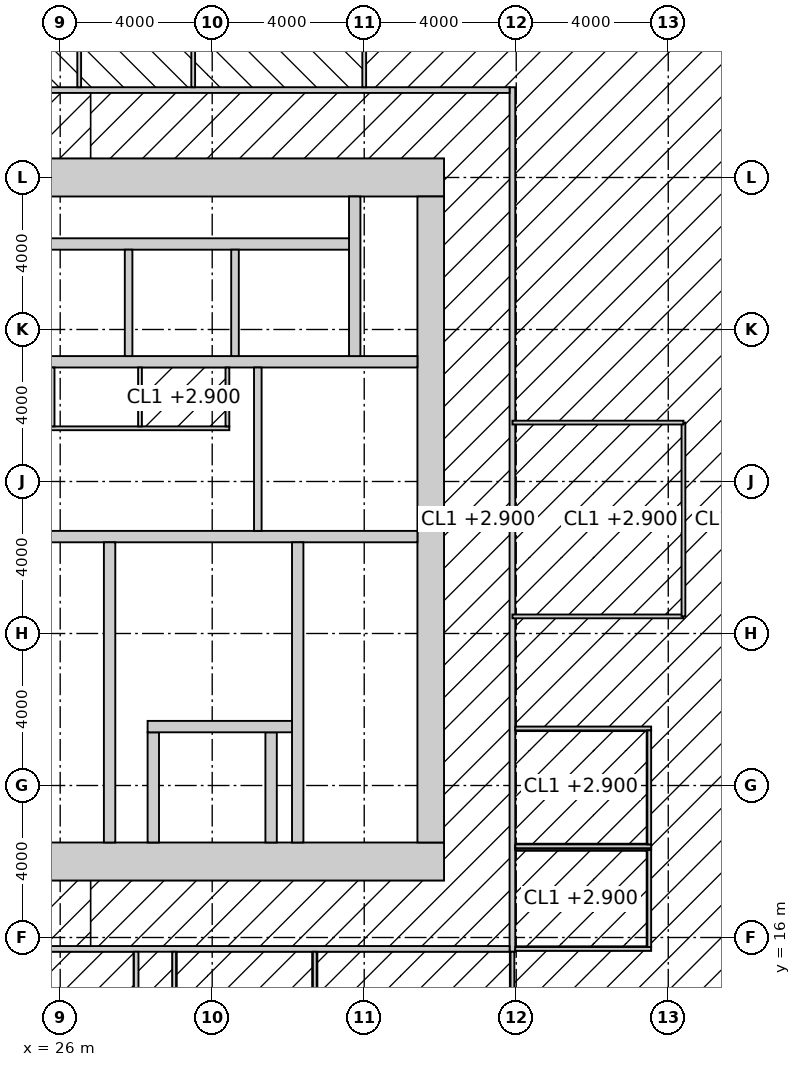
"""IFC4 building model, lengths in metres.
Left out: names, types, materials, properties, quantities, classifications, styles, units other than length and angle.
Written with IfcOpenShell. Run it as: python <this file> out.ifc"""

import sys

from ifc_helpers import new_model, si_unit, direction, frame, frame_2d, origin, place, context, subcontext, project, spatial, rectangle, extrude, element, fill, save


model = new_model("IFC4")
c1 = context("Model", 3, precision=1e-05, world=origin(), true_north=direction((0.0, 1.0)))
c2 = subcontext(c1, "Body", "Model", "MODEL_VIEW")
j1 = project(units=[si_unit("LENGTHUNIT", "METRE"), si_unit("PLANEANGLEUNIT", "RADIAN")], contexts=[c1])
p1 = place(None, origin())
s1 = spatial("IfcSite", under=j1, at=p1, CompositionType="ELEMENT")
p2 = place(p1, origin())
s2 = spatial("IfcBuilding", under=s1, at=p2, CompositionType="ELEMENT")
p3 = place(p2, frame((0.0, 0.0, 147.8)))
s3 = spatial("IfcBuildingStorey", under=s2, at=p3, CompositionType="ELEMENT", Elevation=147.8)
p4 = place(p3, frame((18.5, 18.0, -0.15), z_axis=(0.0, 0.0, 1.0), x_axis=(1.0, 0.0, 0.0)))
e1 = element("IfcWall", 1, at=p4, inside=s3, PredefinedType="SHEAR", context=c2, shape_type="SweptSolid", body=[
    extrude(rectangle(XDim=17.6, YDim=1.0, at=frame_2d((8.8, 0.0))), origin(), (0.0, 0.0, 1.0), 4.0),
])
p5 = place(p4, frame((3.45, 0.0, 0.15)))
e2 = element("IfcOpeningElement", 2, at=p5, cuts=e1, PredefinedType="OPENING", context=c2, shape_type="SweptSolid", body=[
    extrude(rectangle(XDim=1.5, YDim=2.4, at=frame_2d((0.75, 1.2))), frame((0.0, 0.51, 0.0), z_axis=(0.0, -1.0, 0.0), x_axis=(1.0, 0.0, 0.0)), (0.0, 0.0, 1.0), 1.02),
])
p6 = place(p3, frame((18.5, 36.0, -0.15), z_axis=(0.0, 0.0, 1.0), x_axis=(1.0, 0.0, 0.0)))
e3 = element("IfcWall", 3, at=p6, inside=s3, PredefinedType="SHEAR", context=c2, shape_type="SweptSolid", body=[
    extrude(rectangle(XDim=17.6, YDim=1.0, at=frame_2d((8.8, 0.0))), origin(), (0.0, 0.0, 1.0), 4.0),
])
p7 = place(p3, frame((35.75, 18.5, -0.15), z_axis=(0.0, 0.0, 1.0), x_axis=(0.0, 1.0, 0.0)))
e4 = element("IfcWall", 4, at=p7, inside=s3, PredefinedType="SHEAR", context=c2, shape_type="SweptSolid", body=[
    extrude(rectangle(XDim=17.0, YDim=0.7, at=frame_2d((8.5, 0.0))), origin(), (0.0, 0.0, 1.0), 4.0),
])
p8 = place(p7, frame((9.85, 0.0, 0.15)))
e5 = element("IfcOpeningElement", 5, at=p8, cuts=e4, PredefinedType="OPENING", context=c2, shape_type="SweptSolid", body=[
    extrude(rectangle(XDim=1.0, YDim=2.2, at=frame_2d((0.5, 1.1))), frame((0.0, 0.36, 0.0), z_axis=(0.0, -1.0, 0.0), x_axis=(1.0, 0.0, 0.0)), (0.0, 0.0, 1.0), 0.72),
])
p9 = place(p3, frame((24.15, 26.55, -0.15), z_axis=(0.0, 0.0, 1.0), x_axis=(1.0, 0.0, 0.0)))
e6 = element("IfcWall", 6, at=p9, inside=s3, PredefinedType="SHEAR", context=c2, shape_type="SweptSolid", body=[
    extrude(rectangle(XDim=11.25, YDim=0.3, at=frame_2d((5.625, 0.0))), origin(), (0.0, 0.0, 1.0), 4.0),
])
p10 = place(p9, frame((9.25, 0.0, 0.15)))
e7 = element("IfcOpeningElement", 7, at=p10, cuts=e6, PredefinedType="OPENING", context=c2, shape_type="SweptSolid", body=[
    extrude(rectangle(XDim=1.0, YDim=2.2, at=frame_2d((0.5, 1.1))), frame((0.0, 0.16, 0.0), z_axis=(0.0, -1.0, 0.0), x_axis=(1.0, 0.0, 0.0)), (0.0, 0.0, 1.0), 0.32),
])
p11 = place(p9, frame((4.9, 0.0, 0.15)))
e8 = element("IfcOpeningElement", 8, at=p11, cuts=e6, PredefinedType="OPENING", context=c2, shape_type="SweptSolid", body=[
    extrude(rectangle(XDim=1.5, YDim=2.4, at=frame_2d((0.75, 1.2))), frame((0.0, 0.16, 0.0), z_axis=(0.0, -1.0, 0.0), x_axis=(1.0, 0.0, 0.0)), (0.0, 0.0, 1.0), 0.32),
])
p12 = place(p3, frame((27.3, 18.5, -0.15), z_axis=(0.0, 0.0, 1.0), x_axis=(0.0, 1.0, 0.0)))
e9 = element("IfcWall", 9, at=p12, inside=s3, PredefinedType="SHEAR", context=c2, shape_type="SweptSolid", body=[
    extrude(rectangle(XDim=7.9, YDim=0.3, at=frame_2d((3.95, 0.0))), origin(), (0.0, 0.0, 1.0), 4.0),
])
p13 = place(p12, frame((6.4, 0.0, 0.15)))
e10 = element("IfcOpeningElement", 10, at=p13, cuts=e9, PredefinedType="OPENING", context=c2, shape_type="SweptSolid", body=[
    extrude(rectangle(XDim=1.0, YDim=2.2, at=frame_2d((0.5, 1.1))), frame((0.0, 0.16, 0.0), z_axis=(0.0, -1.0, 0.0), x_axis=(1.0, 0.0, 0.0)), (0.0, 0.0, 1.0), 0.32),
])
p14 = place(p3, frame((32.25, 18.5, -0.15), z_axis=(0.0, 0.0, 1.0), x_axis=(0.0, 1.0, 0.0)))
e11 = element("IfcWall", 11, at=p14, inside=s3, PredefinedType="SHEAR", context=c2, shape_type="SweptSolid", body=[
    extrude(rectangle(XDim=7.9, YDim=0.3, at=frame_2d((3.95, 0.0))), origin(), (0.0, 0.0, 1.0), 4.0),
])
for number, where, z_axis, x_axis in (
    (12, (28.45, 18.5, -0.15), (0.0, 0.0, 1.0), (0.0, 1.0, 0.0)),
    (13, (31.55, 18.5, -0.15), (0.0, 0.0, 1.0), (0.0, 1.0, 0.0)),
):
    element("IfcWall", number, at=place(p3, frame(where, z_axis=z_axis, x_axis=x_axis)), inside=s3, PredefinedType="SHEAR", context=c2, shape_type="SweptSolid", body=[
        extrude(rectangle(XDim=2.9, YDim=0.3, at=frame_2d((1.45, 0.0))), origin(), (0.0, 0.0, 1.0), 4.0),
    ])
p15 = place(p3, frame((28.3, 21.55, -0.15), z_axis=(0.0, 0.0, 1.0), x_axis=(1.0, 0.0, 0.0)))
e14 = element("IfcWall", 14, at=p15, inside=s3, PredefinedType="SHEAR", context=c2, shape_type="SweptSolid", body=[
    extrude(rectangle(XDim=3.8, YDim=0.3, at=frame_2d((1.9, 0.0))), origin(), (0.0, 0.0, 1.0), 4.0),
])
p16 = place(p15, frame((1.05, 0.0, 0.15)))
e15 = element("IfcOpeningElement", 15, at=p16, cuts=e14, PredefinedType="OPENING", context=c2, shape_type="SweptSolid", body=[
    extrude(rectangle(XDim=1.3, YDim=2.4, at=frame_2d((0.65, 1.2))), frame((0.0, 0.16, 0.0), z_axis=(0.0, -1.0, 0.0), x_axis=(1.0, 0.0, 0.0)), (0.0, 0.0, 1.0), 0.32),
])
p17 = place(p3, frame((24.15, 31.15, -0.15), z_axis=(0.0, 0.0, 1.0), x_axis=(1.0, 0.0, 0.0)))
e16 = element("IfcWall", 16, at=p17, inside=s3, PredefinedType="SHEAR", context=c2, shape_type="SweptSolid", body=[
    extrude(rectangle(XDim=11.25, YDim=0.3, at=frame_2d((5.625, 0.0))), origin(), (0.0, 0.0, 1.0), 4.0),
])
p18 = place(p17, frame((7.25, 0.0, 0.15)))
e17 = element("IfcOpeningElement", 17, at=p18, cuts=e16, PredefinedType="OPENING", context=c2, shape_type="SweptSolid", body=[
    extrude(rectangle(XDim=1.4, YDim=2.4, at=frame_2d((0.7, 1.2))), frame((0.0, 0.16, 0.0), z_axis=(0.0, -1.0, 0.0), x_axis=(1.0, 0.0, 0.0)), (0.0, 0.0, 1.0), 0.32),
])
p19 = place(p3, frame((33.75, 31.3, -0.15), z_axis=(0.0, 0.0, 1.0), x_axis=(0.0, 1.0, 0.0)))
e18 = element("IfcWall", 18, at=p19, inside=s3, PredefinedType="SHEAR", context=c2, shape_type="SweptSolid", body=[
    extrude(rectangle(XDim=4.2, YDim=0.3, at=frame_2d((2.1, 0.0))), origin(), (0.0, 0.0, 1.0), 4.0),
])
p20 = place(p3, frame((25.0, 34.25, -0.15), z_axis=(0.0, 0.0, 1.0), x_axis=(1.0, 0.0, 0.0)))
e19 = element("IfcWall", 19, at=p20, inside=s3, PredefinedType="SHEAR", context=c2, shape_type="SweptSolid", body=[
    extrude(rectangle(XDim=8.6, YDim=0.3, at=frame_2d((4.3, 0.0))), origin(), (0.0, 0.0, 1.0), 4.0),
])
for number, where, z_axis, x_axis in (
    (20, (27.8, 31.3, -0.15), (0.0, 0.0, 1.0), (0.0, 1.0, 0.0)),
    (21, (30.6, 31.3, -0.15), (0.0, 0.0, 1.0), (0.0, 1.0, 0.0)),
):
    element("IfcWall", number, at=place(p3, frame(where, z_axis=z_axis, x_axis=x_axis)), inside=s3, PredefinedType="SOLIDWALL", context=c2, shape_type="SweptSolid", body=[
        extrude(rectangle(XDim=2.8, YDim=0.2, at=frame_2d((1.4, 0.0))), origin(), (0.0, 0.0, 1.0), 4.0),
    ])
p21 = place(p3, frame((31.2, 26.7, 0.0), z_axis=(0.0, 0.0, 1.0), x_axis=(0.0, 1.0, 0.0)))
e22 = element("IfcWall", 22, at=p21, inside=s3, PredefinedType="SOLIDWALL", context=c2, shape_type="SweptSolid", body=[
    extrude(rectangle(XDim=4.3, YDim=0.2, at=frame_2d((2.15, 0.0))), origin(), (0.0, 0.0, 1.0), 3.85),
])
p22 = place(p3, frame((25.75, 29.4, 0.0), z_axis=(0.0, 0.0, 1.0), x_axis=(1.0, 0.0, 0.0)))
e23 = element("IfcWall", 23, at=p22, inside=s3, PredefinedType="PARTITIONING", context=c2, shape_type="SweptSolid", body=[
    extrude(rectangle(XDim=4.7, YDim=0.1, at=frame_2d((2.35, 0.0))), origin(), (0.0, 0.0, 1.0), 3.85),
])
p23 = place(p22, frame((0.7, 0.0, 0.0)))
e24 = element("IfcOpeningElement", 24, at=p23, cuts=e23, PredefinedType="OPENING", context=c2, shape_type="SweptSolid", body=[
    extrude(rectangle(XDim=1.0, YDim=2.2, at=frame_2d((0.5, 1.1))), frame((0.0, 0.06, 0.0), z_axis=(0.0, -1.0, 0.0), x_axis=(1.0, 0.0, 0.0)), (0.0, 0.0, 1.0), 0.12),
])
p24 = place(p22, frame((3.0, 0.0, 0.0)))
e25 = element("IfcOpeningElement", 25, at=p24, cuts=e23, PredefinedType="OPENING", context=c2, shape_type="SweptSolid", body=[
    extrude(rectangle(XDim=1.0, YDim=2.2, at=frame_2d((0.5, 1.1))), frame((0.0, 0.06, 0.0), z_axis=(0.0, -1.0, 0.0), x_axis=(1.0, 0.0, 0.0)), (0.0, 0.0, 1.0), 0.12),
])
for number, where, z_axis, x_axis in (
    (26, (25.8, 29.45, 0.0), (0.0, 0.0, 1.0), (0.0, 1.0, 0.0)),
    (27, (30.4, 29.45, 0.0), (0.0, 0.0, 1.0), (0.0, 1.0, 0.0)),
    (28, (28.1, 29.45, 0.0), (0.0, 0.0, 1.0), (0.0, 1.0, 0.0)),
):
    element("IfcWall", number, at=place(p3, frame(where, z_axis=z_axis, x_axis=x_axis)), inside=s3, PredefinedType="PARTITIONING", context=c2, shape_type="SweptSolid", body=[
        extrude(rectangle(XDim=1.55, YDim=0.1, at=frame_2d((0.775, 0.0))), origin(), (0.0, 0.0, 1.0), 3.85),
    ])
p25 = place(p3, frame((37.9, 15.625, 0.0), z_axis=(0.0, 0.0, 1.0), x_axis=(0.0, 1.0, 0.0)))
e29 = element("IfcWall", 29, at=p25, inside=s3, PredefinedType="PARTITIONING", context=c2, shape_type="SweptSolid", body=[
    extrude(rectangle(XDim=22.75, YDim=0.15, at=frame_2d((11.375, 0.0))), origin(), (0.0, 0.0, 1.0), 2.95),
])
p26 = place(p25, frame((10.475, 0.0, 0.0)))
e30 = element("IfcOpeningElement", 30, at=p26, cuts=e29, PredefinedType="OPENING", context=c2, shape_type="SweptSolid", body=[
    extrude(rectangle(XDim=1.8, YDim=2.4, at=frame_2d((0.9, 1.2))), frame((0.0, 0.085, 0.0), z_axis=(0.0, -1.0, 0.0), x_axis=(1.0, 0.0, 0.0)), (0.0, 0.0, 1.0), 0.17),
])
p27 = place(p3, frame((15.175, 15.7, 0.0), z_axis=(0.0, 0.0, 1.0), x_axis=(1.0, 0.0, 0.0)))
e31 = element("IfcWall", 31, at=p27, inside=s3, PredefinedType="PARTITIONING", context=c2, shape_type="SweptSolid", body=[
    extrude(rectangle(XDim=22.65, YDim=0.15, at=frame_2d((11.325, 0.0))), origin(), (0.0, 0.0, 1.0), 3.85),
])
p28 = place(p3, frame((15.175, 38.3, 0.0), z_axis=(0.0, 0.0, 1.0), x_axis=(1.0, 0.0, 0.0)))
e32 = element("IfcWall", 32, at=p28, inside=s3, PredefinedType="PARTITIONING", context=c2, shape_type="SweptSolid", body=[
    extrude(rectangle(XDim=22.65, YDim=0.15, at=frame_2d((11.325, 0.0))), origin(), (0.0, 0.0, 1.0), 3.85),
])
p29 = place(p28, frame((8.575, 0.0, 0.0)))
e33 = element("IfcOpeningElement", 33, at=p29, cuts=e32, PredefinedType="OPENING", context=c2, shape_type="SweptSolid", body=[
    extrude(rectangle(XDim=0.9, YDim=2.1, at=frame_2d((0.45, 1.05))), frame((0.0, 0.085, 0.0), z_axis=(0.0, -1.0, 0.0), x_axis=(1.0, 0.0, 0.0)), (0.0, 0.0, 1.0), 0.17),
])
p30 = place(p28, frame((12.325, 0.0, 0.0)))
e34 = element("IfcOpeningElement", 34, at=p30, cuts=e32, PredefinedType="OPENING", context=c2, shape_type="SweptSolid", body=[
    extrude(rectangle(XDim=1.0, YDim=2.1, at=frame_2d((0.5, 1.05))), frame((0.0, 0.085, 0.0), z_axis=(0.0, -1.0, 0.0), x_axis=(1.0, 0.0, 0.0)), (0.0, 0.0, 1.0), 0.17),
])
p31 = place(p28, frame((16.175, 0.0, 0.0)))
e35 = element("IfcOpeningElement", 35, at=p31, cuts=e32, PredefinedType="OPENING", context=c2, shape_type="SweptSolid", body=[
    extrude(rectangle(XDim=0.9, YDim=2.1, at=frame_2d((0.45, 1.05))), frame((0.0, 0.085, 0.0), z_axis=(0.0, -1.0, 0.0), x_axis=(1.0, 0.0, 0.0)), (0.0, 0.0, 1.0), 0.17),
])
p32 = place(p3, frame((34.0, 38.375, 0.0), z_axis=(0.0, 0.0, 1.0), x_axis=(0.0, 1.0, 0.0)))
e36 = element("IfcWall", 36, at=p32, inside=s3, PredefinedType="PARTITIONING", context=c2, shape_type="SweptSolid", body=[
    extrude(rectangle(XDim=3.675, YDim=0.1, at=frame_2d((1.837, 0.0))), origin(), (0.0, 0.0, 1.0), 2.95),
])
for number, where, z_axis, x_axis in (
    (37, (26.5, 38.375, 0.0), (0.0, 0.0, 1.0), (0.0, 1.0, 0.0)),
    (38, (29.5, 38.375, 0.0), (0.0, 0.0, 1.0), (0.0, 1.0, 0.0)),
):
    element("IfcWall", number, at=place(p3, frame(where, z_axis=z_axis, x_axis=x_axis)), inside=s3, PredefinedType="PARTITIONING", context=c2, shape_type="SweptSolid", body=[
        extrude(rectangle(XDim=3.575, YDim=0.1, at=frame_2d((1.788, 0.0))), origin(), (0.0, 0.0, 1.0), 3.85),
    ])
p33 = place(p3, frame((28.0, 4.3, 0.0), z_axis=(0.0, 0.0, 1.0), x_axis=(0.0, 1.0, 0.0)))
e39 = element("IfcWall", 39, at=p33, inside=s3, PredefinedType="PARTITIONING", context=c2, shape_type="SweptSolid", body=[
    extrude(rectangle(XDim=11.325, YDim=0.12, at=frame_2d((5.663, 0.0))), origin(), (0.0, 0.0, 1.0), 3.85),
])
for number, where, z_axis, x_axis in (
    (40, (37.975, 15.7, 0.0), (0.0, 0.0, 1.0), (1.0, 0.0, 0.0)),
    (41, (37.975, 18.35, 0.0), (0.0, 0.0, 1.0), (1.0, 0.0, 0.0)),
    (42, (37.975, 18.4, 0.0), (0.0, 0.0, 1.0), (1.0, 0.0, 0.0)),
    (43, (37.975, 21.5, 0.0), (0.0, 0.0, 1.0), (1.0, 0.0, 0.0)),
):
    element("IfcWall", number, at=place(p3, frame(where, z_axis=z_axis, x_axis=x_axis)), inside=s3, PredefinedType="PARTITIONING", context=c2, shape_type="SweptSolid", body=[
        extrude(rectangle(XDim=3.575, YDim=0.1, at=frame_2d((1.788, 0.0))), origin(), (0.0, 0.0, 1.0), 3.85),
    ])
for number, where, z_axis, x_axis in (
    (44, (28.999, 11.55, 0.0), (0.0, 0.0, 1.0), (0.0, 1.0, 0.0)),
    (45, (32.699, 11.55, 0.0), (0.0, 0.0, 1.0), (0.0, 1.0, 0.0)),
):
    element("IfcWall", number, at=place(p3, frame(where, z_axis=z_axis, x_axis=x_axis)), inside=s3, PredefinedType="PARTITIONING", context=c2, shape_type="SweptSolid", body=[
        extrude(rectangle(XDim=4.075, YDim=0.1, at=frame_2d((2.038, 0.0))), origin(), (0.0, 0.0, 1.0), 3.85),
    ])
p34 = place(p3, frame((37.9, 11.55, 0.0), z_axis=(0.0, 0.0, 1.0), x_axis=(0.0, 1.0, 0.0)))
e46 = element("IfcWall", 46, at=p34, inside=s3, PredefinedType="PARTITIONING", context=c2, shape_type="SweptSolid", body=[
    extrude(rectangle(XDim=4.075, YDim=0.1, at=frame_2d((2.038, 0.0))), origin(), (0.0, 0.0, 1.0), 2.95),
])
p35 = place(p3, frame((41.5, 15.75, 0.0), z_axis=(0.0, 0.0, 1.0), x_axis=(0.0, 1.0, 0.0)))
e47 = element("IfcWall", 47, at=p35, inside=s3, PredefinedType="PARTITIONING", context=c2, shape_type="SweptSolid", body=[
    extrude(rectangle(XDim=2.55, YDim=0.1, at=frame_2d((1.275, 0.0))), origin(), (0.0, 0.0, 1.0), 3.85),
])
p36 = place(p35, frame((0.775, 0.0, 0.0)))
e48 = element("IfcOpeningElement", 48, at=p36, cuts=e47, PredefinedType="OPENING", context=c2, shape_type="SweptSolid", body=[
    extrude(rectangle(XDim=1.0, YDim=2.2, at=frame_2d((0.5, 1.1))), frame((0.0, 0.06, 0.0), z_axis=(0.0, -1.0, 0.0), x_axis=(1.0, 0.0, 0.0)), (0.0, 0.0, 1.0), 0.12),
])
p37 = place(p3, frame((41.5, 18.45, 0.0), z_axis=(0.0, 0.0, 1.0), x_axis=(0.0, 1.0, 0.0)))
e49 = element("IfcWall", 49, at=p37, inside=s3, PredefinedType="PARTITIONING", context=c2, shape_type="SweptSolid", body=[
    extrude(rectangle(XDim=3.0, YDim=0.1, at=frame_2d((1.5, 0.0))), origin(), (0.0, 0.0, 1.0), 3.85),
])
p38 = place(p37, frame((1.0, 0.0, 0.0)))
e50 = element("IfcOpeningElement", 50, at=p38, cuts=e49, PredefinedType="OPENING", context=c2, shape_type="SweptSolid", body=[
    extrude(rectangle(XDim=1.0, YDim=2.2, at=frame_2d((0.5, 1.1))), frame((0.0, 0.06, 0.0), z_axis=(0.0, -1.0, 0.0), x_axis=(1.0, 0.0, 0.0)), (0.0, 0.0, 1.0), 0.12),
])
p39 = place(p3, frame((37.9, 24.45, 0.0), z_axis=(0.0, 0.0, 1.0), x_axis=(1.0, 0.0, 0.0)))
e51 = element("IfcWall", 51, at=p39, inside=s3, PredefinedType="PARTITIONING", context=c2, shape_type="SweptSolid", body=[
    extrude(rectangle(XDim=4.5, YDim=0.1, at=frame_2d((2.25, 0.0))), origin(), (0.0, 0.0, 1.0), 3.85),
])
p40 = place(p3, frame((42.4, 24.45, 0.0), z_axis=(0.0, 0.0, 1.0), x_axis=(0.0, 1.0, 0.0)))
e52 = element("IfcWall", 52, at=p40, inside=s3, PredefinedType="PARTITIONING", context=c2, shape_type="SweptSolid", body=[
    extrude(rectangle(XDim=5.1, YDim=0.1, at=frame_2d((2.55, 0.0))), origin(), (0.0, 0.0, 1.0), 3.85),
])
p41 = place(p40, frame((2.05, 0.0, 0.0)))
e53 = element("IfcOpeningElement", 53, at=p41, cuts=e52, PredefinedType="OPENING", context=c2, shape_type="SweptSolid", body=[
    extrude(rectangle(XDim=1.0, YDim=2.2, at=frame_2d((0.5, 1.1))), frame((0.0, 0.06, 0.0), z_axis=(0.0, -1.0, 0.0), x_axis=(1.0, 0.0, 0.0)), (0.0, 0.0, 1.0), 0.12),
])
p42 = place(p3, frame((42.4, 29.55, 0.0), z_axis=(0.0, 0.0, 1.0), x_axis=(-1.0, 0.0, 0.0)))
e54 = element("IfcWall", 54, at=p42, inside=s3, PredefinedType="PARTITIONING", context=c2, shape_type="SweptSolid", body=[
    extrude(rectangle(XDim=4.5, YDim=0.1, at=frame_2d((2.25, 0.0))), origin(), (0.0, 0.0, 1.0), 3.85),
])
p43 = place(p13, origin())
e55 = element("IfcDoor", 55, at=p43, inside=s3, OperationType="SINGLE_SWING_RIGHT", PredefinedType="DOOR", context=c2, shape_type="SweptSolid", body=[
    extrude(rectangle(XDim=1.0, YDim=2.2, at=frame_2d((0.5, 1.1))), frame((0.0, 0.025, 0.0), z_axis=(0.0, -1.0, 0.0), x_axis=(1.0, 0.0, 0.0)), (0.0, 0.0, 1.0), 0.05),
])
fill(e10, e55)
p44 = place(p10, frame((1.0, 0.0, 0.0), z_axis=(0.0, 0.0, 1.0), x_axis=(-1.0, 0.0, 0.0)))
e56 = element("IfcDoor", 56, at=p44, inside=s3, OperationType="SINGLE_SWING_RIGHT", PredefinedType="DOOR", context=c2, shape_type="SweptSolid", body=[
    extrude(rectangle(XDim=1.0, YDim=2.2, at=frame_2d((0.5, 1.1))), frame((0.0, 0.025, 0.0), z_axis=(0.0, -1.0, 0.0), x_axis=(1.0, 0.0, 0.0)), (0.0, 0.0, 1.0), 0.05),
])
fill(e7, e56)
p45 = place(p8, origin())
e57 = element("IfcDoor", 57, at=p45, inside=s3, OperationType="SINGLE_SWING_RIGHT", PredefinedType="DOOR", context=c2, shape_type="SweptSolid", body=[
    extrude(rectangle(XDim=1.0, YDim=2.2, at=frame_2d((0.5, 1.1))), frame((0.0, 0.025, 0.0), z_axis=(0.0, -1.0, 0.0), x_axis=(1.0, 0.0, 0.0)), (0.0, 0.0, 1.0), 0.05),
])
fill(e5, e57)
p46 = place(p11, origin())
e58 = element("IfcDoor", 58, at=p46, inside=s3, OperationType="DOUBLE_DOOR_DOUBLE_SWING", PredefinedType="DOOR", context=c2, shape_type="SweptSolid", body=[
    extrude(rectangle(XDim=1.5, YDim=2.4, at=frame_2d((0.75, 1.2))), frame((0.0, 0.025, 0.0), z_axis=(0.0, -1.0, 0.0), x_axis=(1.0, 0.0, 0.0)), (0.0, 0.0, 1.0), 0.05),
])
fill(e8, e58)
p47 = place(p23, origin())
e59 = element("IfcDoor", 59, at=p47, inside=s3, OperationType="SINGLE_SWING_LEFT", PredefinedType="DOOR", context=c2, shape_type="SweptSolid", body=[
    extrude(rectangle(XDim=1.0, YDim=2.2, at=frame_2d((0.5, 1.1))), frame((0.0, 0.025, 0.0), z_axis=(0.0, -1.0, 0.0), x_axis=(1.0, 0.0, 0.0)), (0.0, 0.0, 1.0), 0.05),
])
fill(e24, e59)
p48 = place(p24, origin())
e60 = element("IfcDoor", 60, at=p48, inside=s3, OperationType="SINGLE_SWING_LEFT", PredefinedType="DOOR", context=c2, shape_type="SweptSolid", body=[
    extrude(rectangle(XDim=1.0, YDim=2.2, at=frame_2d((0.5, 1.1))), frame((0.0, 0.025, 0.0), z_axis=(0.0, -1.0, 0.0), x_axis=(1.0, 0.0, 0.0)), (0.0, 0.0, 1.0), 0.05),
])
fill(e25, e60)
p49 = place(p30, origin())
e61 = element("IfcDoor", 61, at=p49, inside=s3, OperationType="SLIDING_TO_LEFT", PredefinedType="DOOR", context=c2, shape_type="SweptSolid", body=[
    extrude(rectangle(XDim=1.0, YDim=2.1, at=frame_2d((0.5, 1.05))), frame((0.0, 0.025, 0.0), z_axis=(0.0, -1.0, 0.0), x_axis=(1.0, 0.0, 0.0)), (0.0, 0.0, 1.0), 0.05),
])
fill(e34, e61)
p50 = place(p31, origin())
e62 = element("IfcDoor", 62, at=p50, inside=s3, OperationType="SINGLE_SWING_LEFT", PredefinedType="DOOR", context=c2, shape_type="SweptSolid", body=[
    extrude(rectangle(XDim=0.9, YDim=2.1, at=frame_2d((0.45, 1.05))), frame((0.0, 0.025, 0.0), z_axis=(0.0, -1.0, 0.0), x_axis=(1.0, 0.0, 0.0)), (0.0, 0.0, 1.0), 0.05),
])
fill(e35, e62)
p51 = place(p26, origin())
e63 = element("IfcDoor", 63, at=p51, inside=s3, OperationType="DOUBLE_DOOR_DOUBLE_SWING", PredefinedType="DOOR", context=c2, shape_type="SweptSolid", body=[
    extrude(rectangle(XDim=1.8, YDim=2.4, at=frame_2d((0.9, 1.2))), frame((0.0, 0.025, 0.0), z_axis=(0.0, -1.0, 0.0), x_axis=(1.0, 0.0, 0.0)), (0.0, 0.0, 1.0), 0.05),
])
fill(e30, e63)
p52 = place(p36, origin())
e64 = element("IfcDoor", 64, at=p52, inside=s3, OperationType="SINGLE_SWING_LEFT", PredefinedType="DOOR", context=c2, shape_type="SweptSolid", body=[
    extrude(rectangle(XDim=1.0, YDim=2.2, at=frame_2d((0.5, 1.1))), frame((0.0, 0.025, 0.0), z_axis=(0.0, -1.0, 0.0), x_axis=(1.0, 0.0, 0.0)), (0.0, 0.0, 1.0), 0.05),
])
fill(e48, e64)
p53 = place(p38, origin())
e65 = element("IfcDoor", 65, at=p53, inside=s3, OperationType="SINGLE_SWING_LEFT", PredefinedType="DOOR", context=c2, shape_type="SweptSolid", body=[
    extrude(rectangle(XDim=1.0, YDim=2.2, at=frame_2d((0.5, 1.1))), frame((0.0, 0.025, 0.0), z_axis=(0.0, -1.0, 0.0), x_axis=(1.0, 0.0, 0.0)), (0.0, 0.0, 1.0), 0.05),
])
fill(e50, e65)
p54 = place(p41, origin())
e66 = element("IfcDoor", 66, at=p54, inside=s3, OperationType="SINGLE_SWING_RIGHT", PredefinedType="DOOR", context=c2, shape_type="SweptSolid", body=[
    extrude(rectangle(XDim=1.0, YDim=2.2, at=frame_2d((0.5, 1.1))), frame((0.0, 0.025, 0.0), z_axis=(0.0, -1.0, 0.0), x_axis=(1.0, 0.0, 0.0)), (0.0, 0.0, 1.0), 0.05),
])
fill(e53, e66)
p55 = place(p16, origin())
e67 = element("IfcDoor", 67, at=p55, inside=s3, OperationType="DOUBLE_DOOR_SLIDING", PredefinedType="DOOR", context=c2, shape_type="SweptSolid", body=[
    extrude(rectangle(XDim=1.3, YDim=2.4, at=frame_2d((0.65, 1.2))), frame((0.0, 0.025, 0.0), z_axis=(0.0, -1.0, 0.0), x_axis=(1.0, 0.0, 0.0)), (0.0, 0.0, 1.0), 0.05),
])
fill(e15, e67)
p56 = place(p18, origin())
e68 = element("IfcDoor", 68, at=p56, inside=s3, OperationType="DOUBLE_DOOR_SLIDING", PredefinedType="DOOR", context=c2, shape_type="SweptSolid", body=[
    extrude(rectangle(XDim=1.4, YDim=2.4, at=frame_2d((0.7, 1.2))), frame((0.0, 0.025, 0.0), z_axis=(0.0, -1.0, 0.0), x_axis=(1.0, 0.0, 0.0)), (0.0, 0.0, 1.0), 0.05),
])
fill(e17, e68)
save(model, sys.argv[1])
